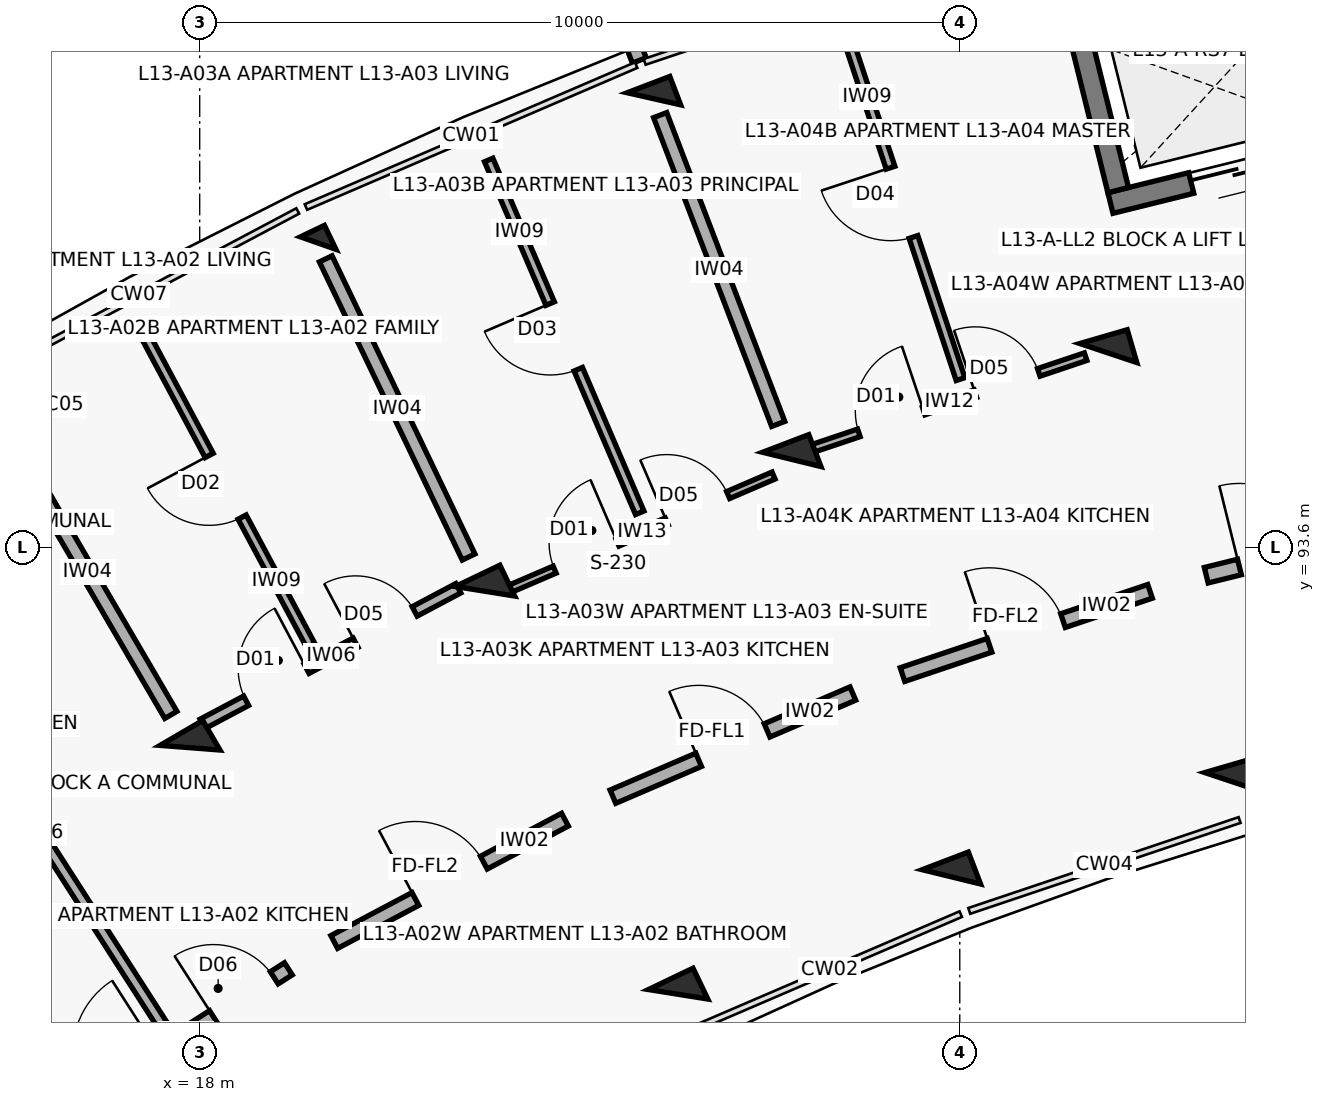
"""IFC4 building model, lengths in metres.
Left out: names, types, materials, properties, quantities, classifications, styles, units other than length and angle.
Written with IfcOpenShell. Run it as: python <this file> out.ifc"""

import sys

from ifc_helpers import new_model, si_unit, direction, frame, frame_2d, origin, origin_2d, place, context, subcontext, project, spatial, rectangle, extrude, element, fill, save


model = new_model("IFC4")
c1 = context("Model", 3, precision=1e-05, world=origin(), true_north=direction((0.0, 1.0)))
c2 = subcontext(c1, "Body", "Model", "MODEL_VIEW")
j1 = project(units=[si_unit("LENGTHUNIT", "METRE"), si_unit("PLANEANGLEUNIT", "RADIAN")], contexts=[c1])
p1 = place(None, origin())
s1 = spatial("IfcSite", under=j1, at=p1, CompositionType="ELEMENT")
p2 = place(p1, origin())
s2 = spatial("IfcBuilding", under=s1, at=p2, CompositionType="ELEMENT")
p3 = place(p2, frame((0.0, 0.0, 42.2)))
s3 = spatial("IfcBuildingStorey", under=s2, at=p3, CompositionType="ELEMENT", Elevation=42.2)
for number, where, z_axis, x_axis in (
    (1, (17.873, 90.96, 0.0), (0.0, 0.0, 1.0), (-0.504, 0.864, 0.0)),
    (2, (24.294, 87.716, 0.0), (0.0, 0.0, 1.0), (-0.432, 0.902, 0.0)),
    (3, (21.754, 93.019, 0.0), (0.0, 0.0, 1.0), (-0.432, 0.902, 0.0)),
):
    element("IfcColumn", number, at=place(p3, frame(where, z_axis=z_axis, x_axis=x_axis)), inside=s3, PredefinedType="COLUMN", context=c2, shape_type="SweptSolid", body=[
        extrude(rectangle(XDim=0.45, YDim=0.65, at=origin_2d()), origin(), (0.0, 0.0, 1.0), 3.1),
    ])
p4 = place(p3, frame((19.559, 97.6, 0.0), z_axis=(0.0, 0.0, 1.0), x_axis=(-0.432085748802, 0.901832526405, 0.0)))
e4 = element("IfcColumn", 4, at=p4, inside=s3, PredefinedType="COLUMN", context=c2, shape_type="SweptSolid", body=[
    extrude(rectangle(XDim=0.35, YDim=0.35, at=origin_2d()), origin(), (0.0, 0.0, 1.0), 3.1),
])
for number, where, z_axis, x_axis in (
    (5, (27.889, 89.261, 0.0), (0.0, 0.0, 1.0), (-0.357, 0.934, 0.0)),
    (6, (25.79, 94.753, 0.0), (0.0, 0.0, 1.0), (-0.357, 0.934, 0.0)),
):
    element("IfcColumn", number, at=place(p3, frame(where, z_axis=z_axis, x_axis=x_axis)), inside=s3, PredefinedType="COLUMN", context=c2, shape_type="SweptSolid", body=[
        extrude(rectangle(XDim=0.45, YDim=0.65, at=origin_2d()), origin(), (0.0, 0.0, 1.0), 3.1),
    ])
p5 = place(p3, frame((23.976, 99.499, 0.0), z_axis=(0.0, 0.0, 1.0), x_axis=(-0.357064076459, 0.934079892355, 0.0)))
e7 = element("IfcColumn", 7, at=p5, inside=s3, PredefinedType="COLUMN", context=c2, shape_type="SweptSolid", body=[
    extrude(rectangle(XDim=0.4, YDim=0.6, at=origin_2d()), origin(), (0.0, 0.0, 1.0), 3.1),
])
for number, where, z_axis, x_axis in (
    (8, (31.599, 90.508, 0.0), (0.0, 0.0, 1.0), (-0.28, 0.96, 0.0)),
    (9, (29.954, 96.153, 0.0), (0.0, 0.0, 1.0), (-0.28, 0.96, 0.0)),
):
    element("IfcColumn", number, at=place(p3, frame(where, z_axis=z_axis, x_axis=x_axis)), inside=s3, PredefinedType="COLUMN", context=c2, shape_type="SweptSolid", body=[
        extrude(rectangle(XDim=0.45, YDim=0.65, at=origin_2d()), origin(), (0.0, 0.0, 1.0), 3.1),
    ])
p6 = place(p3, frame((23.783, 100.003, 0.0), z_axis=(0.0, 0.0, 1.0), x_axis=(-0.356942580168, 0.934126326823, 0.0)))
e10 = element("IfcWall", 10, at=p6, inside=s3, PredefinedType="PARAPET", context=c2, shape_type="SweptSolid", body=[
    extrude(rectangle(XDim=0.9, YDim=0.195, at=frame_2d((0.45, 0.0))), origin(), (0.0, 0.0, 1.0), 2.25),
])
p7 = place(p3, frame((33.273, 98.942, 0.0), z_axis=(0.0, 0.0, 1.0), x_axis=(-0.970707542441, -0.240264160972, 0.0)))
e11 = element("IfcWall", 11, at=p7, inside=s3, PredefinedType="SHEAR", context=c2, shape_type="SweptSolid", body=[
    extrude(rectangle(XDim=3.39, YDim=0.28, at=frame_2d((1.695, 0.0))), origin(), (0.0, 0.0, 1.0), 3.55),
])
p8 = place(p7, frame((1.095, 0.0, 0.0)))
e12 = element("IfcOpeningElement", 12, at=p8, cuts=e11, PredefinedType="OPENING", context=c2, shape_type="SweptSolid", body=[
    extrude(rectangle(XDim=1.2, YDim=2.15, at=frame_2d((0.6, 1.075))), frame((0.0, 0.15, 0.0), z_axis=(0.0, -1.0, 0.0), x_axis=(1.0, 0.0, 0.0)), (0.0, 0.0, 1.0), 0.3),
])
p9 = place(p3, frame((30.085, 98.297, 0.0), z_axis=(0.0, 0.0, 1.0), x_axis=(-0.2402993748, 0.970698825832, 0.0)))
e13 = element("IfcWall", 13, at=p9, inside=s3, PredefinedType="SHEAR", context=c2, shape_type="SweptSolid", body=[
    extrude(rectangle(XDim=2.03, YDim=0.28, at=frame_2d((1.015, 0.0))), origin(), (0.0, 0.0, 1.0), 3.55),
])
p10 = place(p3, frame((16.272, 86.199, 0.0), z_axis=(0.0, 0.0, 1.0), x_axis=(0.842257205985, 0.539075874963, 0.0)))
e14 = element("IfcWall", 14, at=p10, inside=s3, PredefinedType="SOLIDWALL", context=c2, shape_type="SweptSolid", body=[
    extrude(rectangle(XDim=3.436, YDim=0.19, at=frame_2d((1.718, 0.0))), origin(), (0.0, 0.0, 1.0), 2.14),
])
p11 = place(p10, frame((0.28, 0.0, 0.0)))
e15 = element("IfcOpeningElement", 15, at=p11, cuts=e14, PredefinedType="OPENING", context=c2, shape_type="SweptSolid", body=[
    extrude(rectangle(XDim=1.12, YDim=2.15, at=frame_2d((0.56, 1.075))), frame((0.0, 0.105, 0.0), z_axis=(0.0, -1.0, 0.0), x_axis=(1.0, 0.0, 0.0)), (0.0, 0.0, 1.0), 0.21),
])
p12 = place(p10, frame((2.266, 0.0, 0.0)))
e16 = element("IfcOpeningElement", 16, at=p12, cuts=e14, PredefinedType="OPENING", context=c2, shape_type="SweptSolid", body=[
    extrude(rectangle(XDim=0.95, YDim=2.1, at=frame_2d((0.475, 1.05))), frame((0.0, 0.105, 0.0), z_axis=(0.0, -1.0, 0.0), x_axis=(1.0, 0.0, 0.0)), (0.0, 0.0, 1.0), 0.21),
])
p13 = place(p3, frame((17.524, 87.288, 0.0), z_axis=(0.0, 0.0, 1.0), x_axis=(-0.540338452216, 0.841447774408, 0.0)))
e17 = element("IfcWall", 17, at=p13, inside=s3, PredefinedType="PARTITIONING", context=c2, shape_type="SweptSolid", body=[
    extrude(rectangle(XDim=7.95, YDim=0.14, at=frame_2d((3.975, 0.0))), origin(), (0.0, 0.0, 1.0), 2.14),
])
p14 = place(p13, frame((6.05, 0.0, 0.0)))
e18 = element("IfcOpeningElement", 18, at=p14, cuts=e17, PredefinedType="OPENING", context=c2, shape_type="SweptSolid", body=[
    extrude(rectangle(XDim=0.92, YDim=2.1, at=frame_2d((0.46, 1.05))), frame((0.0, 0.08, 0.0), z_axis=(0.0, -1.0, 0.0), x_axis=(1.0, 0.0, 0.0)), (0.0, 0.0, 1.0), 0.16),
])
p15 = place(p3, frame((19.77, 88.404, 0.0), z_axis=(0.0, 0.0, 1.0), x_axis=(0.883410853063, 0.468599258099, 0.0)))
e19 = element("IfcWall", 19, at=p15, inside=s3, PredefinedType="SOLIDWALL", context=c2, shape_type="SweptSolid", body=[
    extrude(rectangle(XDim=3.436, YDim=0.19, at=frame_2d((1.718, 0.0))), origin(), (0.0, 0.0, 1.0), 2.14),
])
p16 = place(p15, frame((1.208, 0.0, 0.0)))
e20 = element("IfcOpeningElement", 20, at=p16, cuts=e19, PredefinedType="OPENING", context=c2, shape_type="SweptSolid", body=[
    extrude(rectangle(XDim=1.02, YDim=2.15, at=frame_2d((0.51, 1.075))), frame((0.0, 0.105, 0.0), z_axis=(0.0, -1.0, 0.0), x_axis=(1.0, 0.0, 0.0)), (0.0, 0.0, 1.0), 0.21),
])
p17 = place(p3, frame((18.037, 91.273, 0.0), z_axis=(0.0, 0.0, 1.0), x_axis=(0.883441603894, 0.468541281543, 0.0)))
e21 = element("IfcWall", 21, at=p17, inside=s3, PredefinedType="PARTITIONING", context=c2, shape_type="SweptSolid", body=[
    extrude(rectangle(XDim=3.81, YDim=0.14, at=frame_2d((1.905, 0.0))), origin(), (0.0, 0.0, 1.0), 2.14),
])
p18 = place(p17, frame((0.65, 0.0, 0.0)))
e22 = element("IfcOpeningElement", 22, at=p18, cuts=e21, PredefinedType="OPENING", context=c2, shape_type="SweptSolid", body=[
    extrude(rectangle(XDim=0.9, YDim=2.1, at=frame_2d((0.45, 1.05))), frame((0.0, 0.08, 0.0), z_axis=(0.0, -1.0, 0.0), x_axis=(1.0, 0.0, 0.0)), (0.0, 0.0, 1.0), 0.16),
])
p19 = place(p17, frame((2.28, 0.0, 0.0)))
e23 = element("IfcOpeningElement", 23, at=p19, cuts=e21, PredefinedType="OPENING", context=c2, shape_type="SweptSolid", body=[
    extrude(rectangle(XDim=0.88, YDim=2.1, at=frame_2d((0.44, 1.05))), frame((0.0, 0.08, 0.0), z_axis=(0.0, -1.0, 0.0), x_axis=(1.0, 0.0, 0.0)), (0.0, 0.0, 1.0), 0.16),
])
p20 = place(p3, frame((19.46, 92.306, 0.0), z_axis=(0.0, 0.0, 1.0), x_axis=(-0.471228378949, 0.88201123285, 0.0)))
e24 = element("IfcWall", 24, at=p20, inside=s3, PredefinedType="PARTITIONING", context=c2, shape_type="SweptSolid", body=[
    extrude(rectangle(XDim=4.75, YDim=0.12, at=frame_2d((2.375, 0.0))), origin(), (0.0, 0.0, 1.0), 2.14),
])
p21 = place(p20, frame((1.915, 0.0, 0.0)))
e25 = element("IfcOpeningElement", 25, at=p21, cuts=e24, PredefinedType="OPENING", context=c2, shape_type="SweptSolid", body=[
    extrude(rectangle(XDim=0.92, YDim=2.1, at=frame_2d((0.46, 1.05))), frame((0.0, 0.07, 0.0), z_axis=(0.0, -1.0, 0.0), x_axis=(1.0, 0.0, 0.0)), (0.0, 0.0, 1.0), 0.14),
])
p22 = place(p3, frame((17.621, 91.392, 0.0), z_axis=(0.0, 0.0, 1.0), x_axis=(-0.504216452091, 0.863577309475, 0.0)))
e26 = element("IfcWall", 26, at=p22, inside=s3, PredefinedType="SOLIDWALL", context=c2, shape_type="SweptSolid", body=[
    extrude(rectangle(XDim=4.35, YDim=0.185, at=frame_2d((2.175, 0.0))), origin(), (0.0, 0.0, 1.0), 2.14),
])
p23 = place(p3, frame((23.437, 90.316, 0.0), z_axis=(0.0, 0.0, 1.0), x_axis=(0.918718172399, 0.394913813008, 0.0)))
e27 = element("IfcWall", 27, at=p23, inside=s3, PredefinedType="SOLIDWALL", context=c2, shape_type="SweptSolid", body=[
    extrude(rectangle(XDim=3.436, YDim=0.19, at=frame_2d((1.718, 0.0))), origin(), (0.0, 0.0, 1.0), 2.14),
])
p24 = place(p23, frame((1.228, 0.0, 0.0)))
e28 = element("IfcOpeningElement", 28, at=p24, cuts=e27, PredefinedType="OPENING", context=c2, shape_type="SweptSolid", body=[
    extrude(rectangle(XDim=0.98, YDim=2.15, at=frame_2d((0.49, 1.075))), frame((0.0, 0.105, 0.0), z_axis=(0.0, -1.0, 0.0), x_axis=(1.0, 0.0, 0.0)), (0.0, 0.0, 1.0), 0.21),
])
p25 = place(p3, frame((22.073, 93.047, 0.0), z_axis=(0.0, 0.0, 1.0), x_axis=(0.918737522346, 0.394868794707, 0.0)))
e29 = element("IfcWall", 29, at=p25, inside=s3, PredefinedType="PARTITIONING", context=c2, shape_type="SweptSolid", body=[
    extrude(rectangle(XDim=3.785, YDim=0.1, at=frame_2d((1.893, 0.0))), origin(), (0.0, 0.0, 1.0), 2.14),
])
p26 = place(p25, frame((0.65, 0.0, 0.0)))
e30 = element("IfcOpeningElement", 30, at=p26, cuts=e29, PredefinedType="OPENING", context=c2, shape_type="SweptSolid", body=[
    extrude(rectangle(XDim=0.9, YDim=2.1, at=frame_2d((0.45, 1.05))), frame((0.0, 0.06, 0.0), z_axis=(0.0, -1.0, 0.0), x_axis=(1.0, 0.0, 0.0)), (0.0, 0.0, 1.0), 0.12),
])
p27 = place(p25, frame((2.255, 0.0, 0.0)))
e31 = element("IfcOpeningElement", 31, at=p27, cuts=e29, PredefinedType="OPENING", context=c2, shape_type="SweptSolid", body=[
    extrude(rectangle(XDim=0.88, YDim=2.1, at=frame_2d((0.44, 1.05))), frame((0.0, 0.06, 0.0), z_axis=(0.0, -1.0, 0.0), x_axis=(1.0, 0.0, 0.0)), (0.0, 0.0, 1.0), 0.12),
])
p28 = place(p3, frame((23.789, 94.051, 0.0), z_axis=(0.0, 0.0, 1.0), x_axis=(-0.393539995583, 0.919307495823, 0.0)))
e32 = element("IfcWall", 32, at=p28, inside=s3, PredefinedType="PARTITIONING", context=c2, shape_type="SweptSolid", body=[
    extrude(rectangle(XDim=5.05, YDim=0.12, at=frame_2d((2.525, 0.0))), origin(), (0.0, 0.0, 1.0), 2.14),
])
p29 = place(p28, frame((2.055, 0.0, 0.0)))
e33 = element("IfcOpeningElement", 33, at=p29, cuts=e32, PredefinedType="OPENING", context=c2, shape_type="SweptSolid", body=[
    extrude(rectangle(XDim=0.94, YDim=2.1, at=frame_2d((0.47, 1.05))), frame((0.0, 0.07, 0.0), z_axis=(0.0, -1.0, 0.0), x_axis=(1.0, 0.0, 0.0)), (0.0, 0.0, 1.0), 0.14),
])
p30 = place(p3, frame((21.538, 93.469, 0.0), z_axis=(0.0, 0.0, 1.0), x_axis=(-0.432086898897, 0.901831975371, 0.0)))
e34 = element("IfcWall", 34, at=p30, inside=s3, PredefinedType="SOLIDWALL", context=c2, shape_type="SweptSolid", body=[
    extrude(rectangle(XDim=4.35, YDim=0.185, at=frame_2d((2.175, 0.0))), origin(), (0.0, 0.0, 1.0), 2.14),
])
p31 = place(p3, frame((27.247, 91.923, 0.0), z_axis=(0.0, 0.0, 1.0), x_axis=(0.947863007629, 0.318678080151, 0.0)))
e35 = element("IfcWall", 35, at=p31, inside=s3, PredefinedType="SOLIDWALL", context=c2, shape_type="SweptSolid", body=[
    extrude(rectangle(XDim=3.436, YDim=0.19, at=frame_2d((1.718, 0.0))), origin(), (0.0, 0.0, 1.0), 2.14),
])
p32 = place(p31, frame((1.208, 0.0, 0.0)))
e36 = element("IfcOpeningElement", 36, at=p32, cuts=e35, PredefinedType="OPENING", context=c2, shape_type="SweptSolid", body=[
    extrude(rectangle(XDim=1.02, YDim=2.15, at=frame_2d((0.51, 1.075))), frame((0.0, 0.105, 0.0), z_axis=(0.0, -1.0, 0.0), x_axis=(1.0, 0.0, 0.0)), (0.0, 0.0, 1.0), 0.21),
])
p33 = place(p3, frame((26.056, 94.896, 0.0), z_axis=(0.0, 0.0, 1.0), x_axis=(0.947876567739, 0.318637744673, 0.0)))
e37 = element("IfcWall", 37, at=p33, inside=s3, PredefinedType="PARTITIONING", context=c2, shape_type="SweptSolid", body=[
    extrude(rectangle(XDim=3.797, YDim=0.105, at=frame_2d((1.899, 0.0))), origin(), (0.0, 0.0, 1.0), 2.14),
])
p34 = place(p33, frame((0.65, 0.0, 0.0)))
e38 = element("IfcOpeningElement", 38, at=p34, cuts=e37, PredefinedType="OPENING", context=c2, shape_type="SweptSolid", body=[
    extrude(rectangle(XDim=0.9, YDim=2.1, at=frame_2d((0.45, 1.05))), frame((0.0, 0.062, 0.0), z_axis=(0.0, -1.0, 0.0), x_axis=(1.0, 0.0, 0.0)), (0.0, 0.0, 1.0), 0.125),
])
p35 = place(p33, frame((2.267, 0.0, 0.0)))
e39 = element("IfcOpeningElement", 39, at=p35, cuts=e37, PredefinedType="OPENING", context=c2, shape_type="SweptSolid", body=[
    extrude(rectangle(XDim=0.88, YDim=2.1, at=frame_2d((0.44, 1.05))), frame((0.0, 0.062, 0.0), z_axis=(0.0, -1.0, 0.0), x_axis=(1.0, 0.0, 0.0)), (0.0, 0.0, 1.0), 0.125),
])
p36 = place(p3, frame((28.01, 95.81, 0.0), z_axis=(0.0, 0.0, 1.0), x_axis=(-0.314343770763, 0.949309219266, 0.0)))
e40 = element("IfcWall", 40, at=p36, inside=s3, PredefinedType="PARTITIONING", context=c2, shape_type="SweptSolid", body=[
    extrude(rectangle(XDim=4.9, YDim=0.12, at=frame_2d((2.45, 0.0))), origin(), (0.0, 0.0, 1.0), 2.14),
])
p37 = place(p36, frame((1.97, 0.0, 0.0)))
e41 = element("IfcOpeningElement", 41, at=p37, cuts=e40, PredefinedType="OPENING", context=c2, shape_type="SweptSolid", body=[
    extrude(rectangle(XDim=0.96, YDim=2.1, at=frame_2d((0.48, 1.05))), frame((0.0, 0.07, 0.0), z_axis=(0.0, -1.0, 0.0), x_axis=(1.0, 0.0, 0.0)), (0.0, 0.0, 1.0), 0.14),
])
p38 = place(p3, frame((25.611, 95.22, 0.0), z_axis=(0.0, 0.0, 1.0), x_axis=(-0.357064016205, 0.934079915388, 0.0)))
e42 = element("IfcWall", 42, at=p38, inside=s3, PredefinedType="SOLIDWALL", context=c2, shape_type="SweptSolid", body=[
    extrude(rectangle(XDim=4.35, YDim=0.185, at=frame_2d((2.175, 0.0))), origin(), (0.0, 0.0, 1.0), 2.14),
])
p39 = place(p3, frame((31.243, 93.23, 0.0), z_axis=(0.0, 0.0, 1.0), x_axis=(0.970719238682, 0.240216901263, 0.0)))
e43 = element("IfcWall", 43, at=p39, inside=s3, PredefinedType="SOLIDWALL", context=c2, shape_type="SweptSolid", body=[
    extrude(rectangle(XDim=3.296, YDim=0.21, at=frame_2d((1.648, 0.0))), origin(), (0.0, 0.0, 1.0), 2.14),
])
p40 = place(p39, frame((0.45, 0.0, 0.0)))
e44 = element("IfcOpeningElement", 44, at=p40, cuts=e43, PredefinedType="OPENING", context=c2, shape_type="SweptSolid", body=[
    extrude(rectangle(XDim=1.1, YDim=2.15, at=frame_2d((0.55, 1.075))), frame((0.0, 0.115, 0.0), z_axis=(0.0, -1.0, 0.0), x_axis=(1.0, 0.0, 0.0)), (0.0, 0.0, 1.0), 0.23),
])
p41 = place(p39, frame((1.726, 0.0, 0.0)))
e45 = element("IfcOpeningElement", 45, at=p41, cuts=e43, PredefinedType="OPENING", context=c2, shape_type="SweptSolid", body=[
    extrude(rectangle(XDim=1.12, YDim=2.15, at=frame_2d((0.56, 1.075))), frame((0.0, 0.115, 0.0), z_axis=(0.0, -1.0, 0.0), x_axis=(1.0, 0.0, 0.0)), (0.0, 0.0, 1.0), 0.23),
])
p42 = place(p8, origin())
e46 = element("IfcDoor", 46, at=p42, inside=s3, OperationType="DOUBLE_DOOR_SLIDING", PredefinedType="DOOR", context=c2, shape_type="SweptSolid", body=[
    extrude(rectangle(XDim=1.2, YDim=2.15, at=frame_2d((0.6, 1.075))), frame((0.0, 0.025, 0.0), z_axis=(0.0, -1.0, 0.0), x_axis=(1.0, 0.0, 0.0)), (0.0, 0.0, 1.0), 0.05),
])
fill(e12, e46)
p43 = place(p12, origin())
e47 = element("IfcDoor", 47, at=p43, inside=s3, OperationType="SINGLE_SWING_LEFT", PredefinedType="DOOR", context=c2, shape_type="SweptSolid", body=[
    extrude(rectangle(XDim=0.95, YDim=2.1, at=frame_2d((0.475, 1.05))), frame((0.0, 0.025, 0.0), z_axis=(0.0, -1.0, 0.0), x_axis=(1.0, 0.0, 0.0)), (0.0, 0.0, 1.0), 0.05),
])
fill(e16, e47)
p44 = place(p16, origin())
e48 = element("IfcDoor", 48, at=p44, inside=s3, OperationType="SINGLE_SWING_LEFT", PredefinedType="DOOR", context=c2, shape_type="SweptSolid", body=[
    extrude(rectangle(XDim=1.02, YDim=2.15, at=frame_2d((0.51, 1.075))), frame((0.0, 0.025, 0.0), z_axis=(0.0, -1.0, 0.0), x_axis=(1.0, 0.0, 0.0)), (0.0, 0.0, 1.0), 0.05),
])
fill(e20, e48)
p45 = place(p18, origin())
e49 = element("IfcDoor", 49, at=p45, inside=s3, OperationType="SINGLE_SWING_RIGHT", PredefinedType="DOOR", context=c2, shape_type="SweptSolid", body=[
    extrude(rectangle(XDim=0.9, YDim=2.1, at=frame_2d((0.45, 1.05))), frame((0.0, 0.025, 0.0), z_axis=(0.0, -1.0, 0.0), x_axis=(1.0, 0.0, 0.0)), (0.0, 0.0, 1.0), 0.05),
])
fill(e22, e49)
p46 = place(p19, origin())
e50 = element("IfcDoor", 50, at=p46, inside=s3, OperationType="SINGLE_SWING_LEFT", PredefinedType="DOOR", context=c2, shape_type="SweptSolid", body=[
    extrude(rectangle(XDim=0.88, YDim=2.1, at=frame_2d((0.44, 1.05))), frame((0.0, 0.025, 0.0), z_axis=(0.0, -1.0, 0.0), x_axis=(1.0, 0.0, 0.0)), (0.0, 0.0, 1.0), 0.05),
])
fill(e23, e50)
p47 = place(p21, origin())
e51 = element("IfcDoor", 51, at=p47, inside=s3, OperationType="SINGLE_SWING_RIGHT", PredefinedType="DOOR", context=c2, shape_type="SweptSolid", body=[
    extrude(rectangle(XDim=0.92, YDim=2.1, at=frame_2d((0.46, 1.05))), frame((0.0, 0.025, 0.0), z_axis=(0.0, -1.0, 0.0), x_axis=(1.0, 0.0, 0.0)), (0.0, 0.0, 1.0), 0.05),
])
fill(e25, e51)
p48 = place(p24, origin())
e52 = element("IfcDoor", 52, at=p48, inside=s3, OperationType="SINGLE_SWING_LEFT", PredefinedType="DOOR", context=c2, shape_type="SweptSolid", body=[
    extrude(rectangle(XDim=0.98, YDim=2.15, at=frame_2d((0.49, 1.075))), frame((0.0, 0.025, 0.0), z_axis=(0.0, -1.0, 0.0), x_axis=(1.0, 0.0, 0.0)), (0.0, 0.0, 1.0), 0.05),
])
fill(e28, e52)
p49 = place(p26, origin())
e53 = element("IfcDoor", 53, at=p49, inside=s3, OperationType="SINGLE_SWING_RIGHT", PredefinedType="DOOR", context=c2, shape_type="SweptSolid", body=[
    extrude(rectangle(XDim=0.9, YDim=2.1, at=frame_2d((0.45, 1.05))), frame((0.0, 0.025, 0.0), z_axis=(0.0, -1.0, 0.0), x_axis=(1.0, 0.0, 0.0)), (0.0, 0.0, 1.0), 0.05),
])
fill(e30, e53)
p50 = place(p27, origin())
e54 = element("IfcDoor", 54, at=p50, inside=s3, OperationType="SINGLE_SWING_LEFT", PredefinedType="DOOR", context=c2, shape_type="SweptSolid", body=[
    extrude(rectangle(XDim=0.88, YDim=2.1, at=frame_2d((0.44, 1.05))), frame((0.0, 0.025, 0.0), z_axis=(0.0, -1.0, 0.0), x_axis=(1.0, 0.0, 0.0)), (0.0, 0.0, 1.0), 0.05),
])
fill(e31, e54)
p51 = place(p29, origin())
e55 = element("IfcDoor", 55, at=p51, inside=s3, OperationType="SINGLE_SWING_RIGHT", PredefinedType="DOOR", context=c2, shape_type="SweptSolid", body=[
    extrude(rectangle(XDim=0.94, YDim=2.1, at=frame_2d((0.47, 1.05))), frame((0.0, 0.025, 0.0), z_axis=(0.0, -1.0, 0.0), x_axis=(1.0, 0.0, 0.0)), (0.0, 0.0, 1.0), 0.05),
])
fill(e33, e55)
p52 = place(p32, origin())
e56 = element("IfcDoor", 56, at=p52, inside=s3, OperationType="SINGLE_SWING_LEFT", PredefinedType="DOOR", context=c2, shape_type="SweptSolid", body=[
    extrude(rectangle(XDim=1.02, YDim=2.15, at=frame_2d((0.51, 1.075))), frame((0.0, 0.025, 0.0), z_axis=(0.0, -1.0, 0.0), x_axis=(1.0, 0.0, 0.0)), (0.0, 0.0, 1.0), 0.05),
])
fill(e36, e56)
p53 = place(p34, origin())
e57 = element("IfcDoor", 57, at=p53, inside=s3, OperationType="SINGLE_SWING_RIGHT", PredefinedType="DOOR", context=c2, shape_type="SweptSolid", body=[
    extrude(rectangle(XDim=0.9, YDim=2.1, at=frame_2d((0.45, 1.05))), frame((0.0, 0.025, 0.0), z_axis=(0.0, -1.0, 0.0), x_axis=(1.0, 0.0, 0.0)), (0.0, 0.0, 1.0), 0.05),
])
fill(e38, e57)
p54 = place(p35, origin())
e58 = element("IfcDoor", 58, at=p54, inside=s3, OperationType="SINGLE_SWING_LEFT", PredefinedType="DOOR", context=c2, shape_type="SweptSolid", body=[
    extrude(rectangle(XDim=0.88, YDim=2.1, at=frame_2d((0.44, 1.05))), frame((0.0, 0.025, 0.0), z_axis=(0.0, -1.0, 0.0), x_axis=(1.0, 0.0, 0.0)), (0.0, 0.0, 1.0), 0.05),
])
fill(e39, e58)
p55 = place(p37, origin())
e59 = element("IfcDoor", 59, at=p55, inside=s3, OperationType="SINGLE_SWING_RIGHT", PredefinedType="DOOR", context=c2, shape_type="SweptSolid", body=[
    extrude(rectangle(XDim=0.96, YDim=2.1, at=frame_2d((0.48, 1.05))), frame((0.0, 0.025, 0.0), z_axis=(0.0, -1.0, 0.0), x_axis=(1.0, 0.0, 0.0)), (0.0, 0.0, 1.0), 0.05),
])
fill(e41, e59)
p56 = place(p40, origin())
e60 = element("IfcDoor", 60, at=p56, inside=s3, OperationType="SINGLE_SWING_LEFT", PredefinedType="DOOR", context=c2, shape_type="SweptSolid", body=[
    extrude(rectangle(XDim=1.1, YDim=2.15, at=frame_2d((0.55, 1.075))), frame((0.0, 0.025, 0.0), z_axis=(0.0, -1.0, 0.0), x_axis=(1.0, 0.0, 0.0)), (0.0, 0.0, 1.0), 0.05),
])
fill(e44, e60)
save(model, sys.argv[1])
